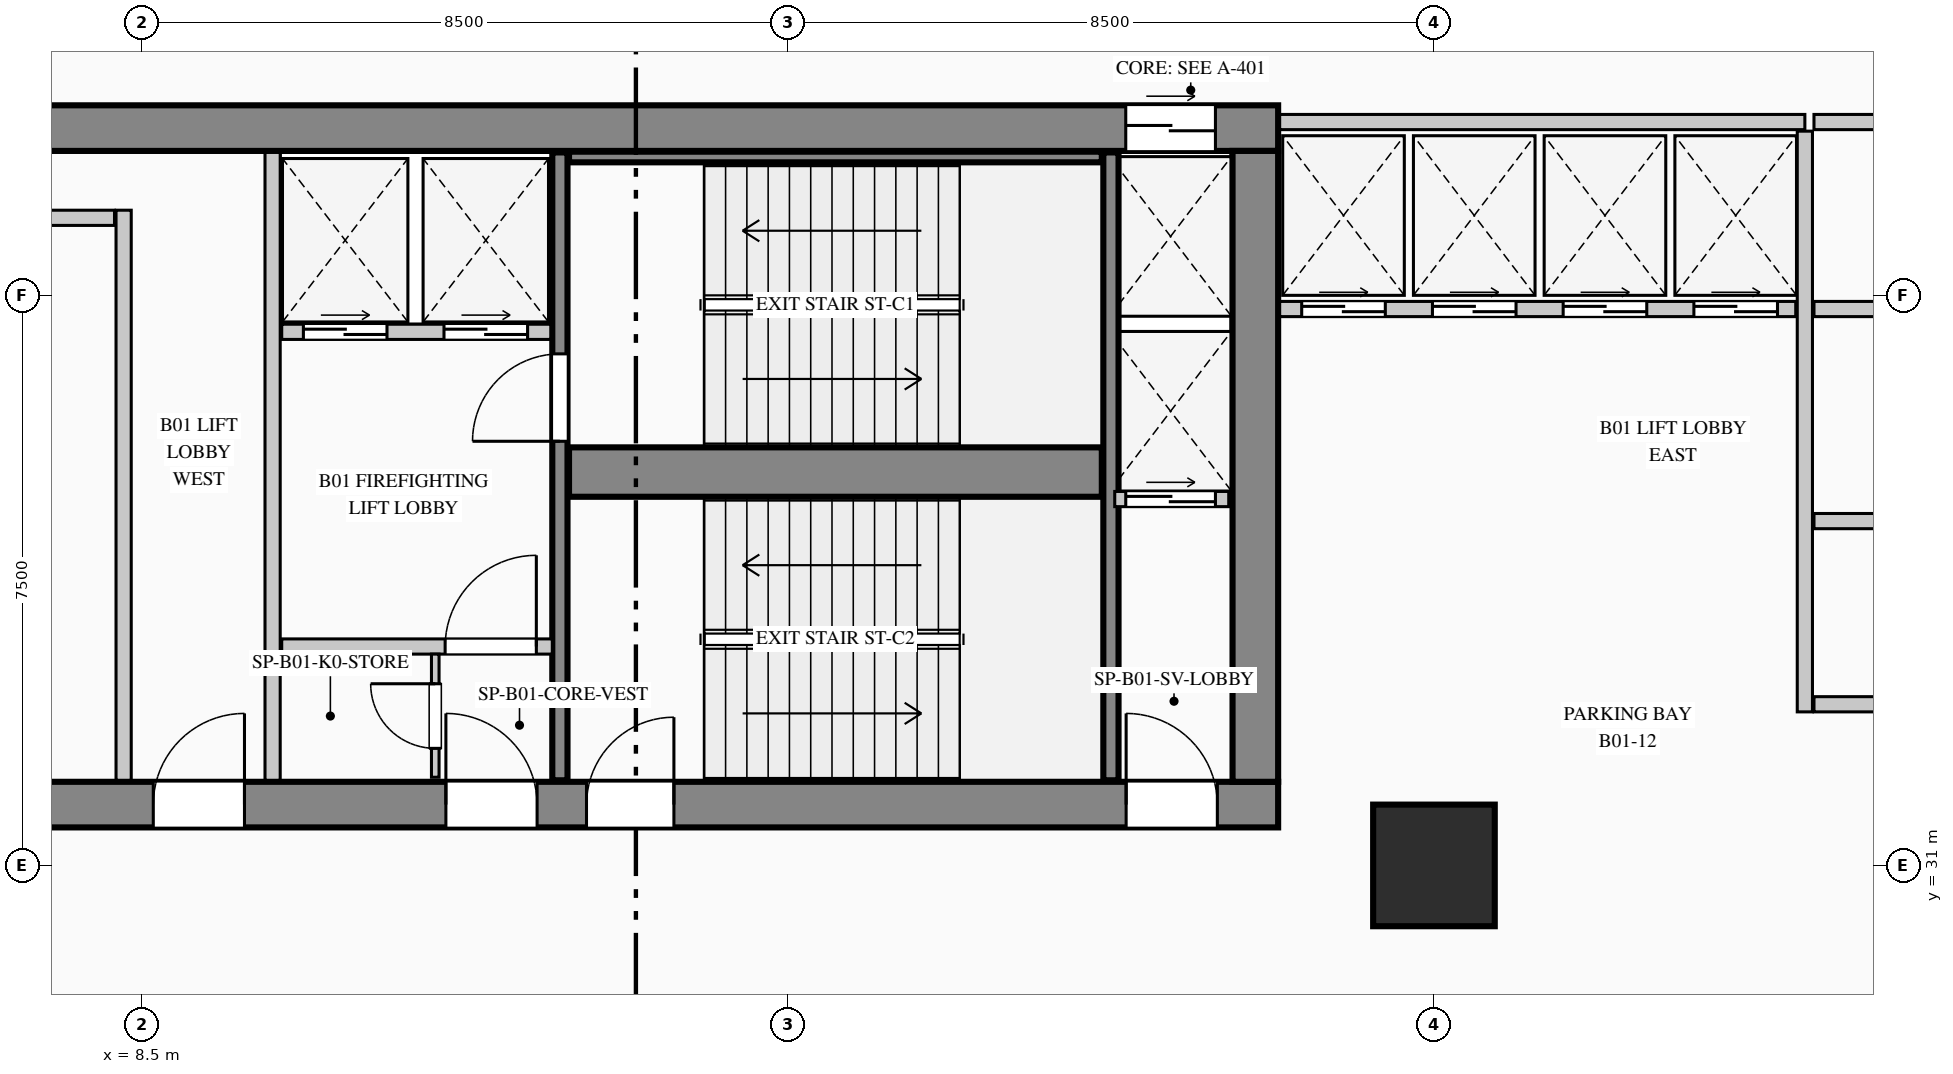
"""IFC4 building model, lengths in metres.
Left out: names, types, materials, properties, quantities, classifications, styles, units other than length and angle.
Written with IfcOpenShell. Run it as: python <this file> out.ifc"""

import sys

from ifc_helpers import new_model, si_unit, direction, frame, frame_2d, origin, origin_2d, place, context, subcontext, project, spatial, rectangle, extrude, element, fill, save


model = new_model("IFC4")
c1 = context("Model", 3, precision=1e-05, world=origin(), true_north=direction((0.0, 1.0)))
c2 = subcontext(c1, "Body", "Model", "MODEL_VIEW")
j1 = project(units=[si_unit("LENGTHUNIT", "METRE"), si_unit("PLANEANGLEUNIT", "RADIAN")], contexts=[c1])
p1 = place(None, origin())
s1 = spatial("IfcSite", under=j1, at=p1, CompositionType="ELEMENT")
p2 = place(p1, origin())
s2 = spatial("IfcBuilding", under=s1, at=p2, CompositionType="ELEMENT")
p3 = place(p2, frame((0.0, 0.0, -4.5)))
s3 = spatial("IfcBuildingStorey", under=s2, at=p3, CompositionType="ELEMENT", Elevation=-4.5)
p4 = place(p3, frame((5.4, 40.7, 0.0), z_axis=(0.0, 0.0, 1.0), x_axis=(1.0, 0.0, 0.0)))
e1 = element("IfcWall", 1, at=p4, inside=s3, PredefinedType="SHEAR", context=c2, shape_type="SweptSolid", body=[
    extrude(rectangle(XDim=18.05, YDim=0.6, at=frame_2d((9.025, 0.0))), origin(), (0.0, 0.0, 1.0), 4.5),
])
p5 = place(p4, frame((16.045, 0.0, 0.0)))
e2 = element("IfcOpeningElement", 2, at=p5, cuts=e1, PredefinedType="OPENING", context=c2, shape_type="SweptSolid", body=[
    extrude(rectangle(XDim=1.18, YDim=2.25, at=frame_2d((0.59, 1.125))), frame((0.0, 0.31, 0.0), z_axis=(0.0, -1.0, 0.0), x_axis=(1.0, 0.0, 0.0)), (0.0, 0.0, 1.0), 0.62),
])
p6 = place(p3, frame((5.4, 31.8, 0.0), z_axis=(0.0, 0.0, 1.0), x_axis=(1.0, 0.0, 0.0)))
e3 = element("IfcWall", 3, at=p6, inside=s3, PredefinedType="SHEAR", context=c2, shape_type="SweptSolid", body=[
    extrude(rectangle(XDim=18.05, YDim=0.6, at=frame_2d((9.025, 0.0))), origin(), (0.0, 0.0, 1.0), 4.5),
])
p7 = place(p6, frame((3.25, 0.0, 0.0)))
e4 = element("IfcOpeningElement", 4, at=p7, cuts=e3, PredefinedType="OPENING", context=c2, shape_type="SweptSolid", body=[
    extrude(rectangle(XDim=1.2, YDim=2.2, at=frame_2d((0.6, 1.1))), frame((0.0, 0.31, 0.0), z_axis=(0.0, -1.0, 0.0), x_axis=(1.0, 0.0, 0.0)), (0.0, 0.0, 1.0), 0.62),
])
p8 = place(p6, frame((7.1, 0.0, 0.0)))
e5 = element("IfcOpeningElement", 5, at=p8, cuts=e3, PredefinedType="OPENING", context=c2, shape_type="SweptSolid", body=[
    extrude(rectangle(XDim=1.2, YDim=2.2, at=frame_2d((0.6, 1.1))), frame((0.0, 0.31, 0.0), z_axis=(0.0, -1.0, 0.0), x_axis=(1.0, 0.0, 0.0)), (0.0, 0.0, 1.0), 0.62),
])
p9 = place(p6, frame((8.95, 0.0, 0.0)))
e6 = element("IfcOpeningElement", 6, at=p9, cuts=e3, PredefinedType="OPENING", context=c2, shape_type="SweptSolid", body=[
    extrude(rectangle(XDim=1.15, YDim=2.2, at=frame_2d((0.575, 1.1))), frame((0.0, 0.31, 0.0), z_axis=(0.0, -1.0, 0.0), x_axis=(1.0, 0.0, 0.0)), (0.0, 0.0, 1.0), 0.62),
])
p10 = place(p6, frame((16.05, 0.0, 0.0)))
e7 = element("IfcOpeningElement", 7, at=p10, cuts=e3, PredefinedType="OPENING", context=c2, shape_type="SweptSolid", body=[
    extrude(rectangle(XDim=1.2, YDim=2.2, at=frame_2d((0.6, 1.1))), frame((0.0, 0.31, 0.0), z_axis=(0.0, -1.0, 0.0), x_axis=(1.0, 0.0, 0.0)), (0.0, 0.0, 1.0), 0.62),
])
p11 = place(p3, frame((23.15, 32.1, 0.0), z_axis=(0.0, 0.0, 1.0), x_axis=(0.0, 1.0, 0.0)))
e8 = element("IfcWall", 8, at=p11, inside=s3, PredefinedType="SHEAR", context=c2, shape_type="SweptSolid", body=[
    extrude(rectangle(XDim=8.3, YDim=0.6, at=frame_2d((4.15, 0.0))), origin(), (0.0, 0.0, 1.0), 4.5),
])
p12 = place(p3, frame((14.0, 32.12, 0.0), z_axis=(0.0, 0.0, 1.0), x_axis=(0.0, 1.0, 0.0)))
e9 = element("IfcWall", 9, at=p12, inside=s3, PredefinedType="SHEAR", context=c2, shape_type="SweptSolid", body=[
    extrude(rectangle(XDim=8.26, YDim=0.2, at=frame_2d((4.13, 0.0))), origin(), (0.0, 0.0, 1.0), 4.5),
])
p13 = place(p12, frame((4.46, 0.0, 0.0)))
e10 = element("IfcOpeningElement", 10, at=p13, cuts=e9, PredefinedType="OPENING", context=c2, shape_type="SweptSolid", body=[
    extrude(rectangle(XDim=1.15, YDim=2.2, at=frame_2d((0.575, 1.1))), frame((0.0, 0.11, 0.0), z_axis=(0.0, -1.0, 0.0), x_axis=(1.0, 0.0, 0.0)), (0.0, 0.0, 1.0), 0.22),
])
p14 = place(p3, frame((14.12, 36.175, 0.0), z_axis=(0.0, 0.0, 1.0), x_axis=(1.0, 0.0, 0.0)))
e11 = element("IfcWall", 11, at=p14, inside=s3, PredefinedType="SHEAR", context=c2, shape_type="SweptSolid", body=[
    extrude(rectangle(XDim=7.01, YDim=0.65, at=frame_2d((3.505, 0.0))), origin(), (0.0, 0.0, 1.0), 4.5),
])
p15 = place(p3, frame((21.25, 32.12, 0.0), z_axis=(0.0, 0.0, 1.0), x_axis=(0.0, 1.0, 0.0)))
e12 = element("IfcWall", 12, at=p15, inside=s3, PredefinedType="SHEAR", context=c2, shape_type="SweptSolid", body=[
    extrude(rectangle(XDim=8.26, YDim=0.2, at=frame_2d((4.13, 0.0))), origin(), (0.0, 0.0, 1.0), 4.5),
])
p16 = place(p3, frame((14.12, 40.32, 0.0), z_axis=(0.0, 0.0, 1.0), x_axis=(1.0, 0.0, 0.0)))
e13 = element("IfcWall", 13, at=p16, inside=s3, PredefinedType="SHEAR", context=c2, shape_type="SweptSolid", body=[
    extrude(rectangle(XDim=7.01, YDim=0.14, at=frame_2d((3.505, 0.0))), origin(), (0.0, 0.0, 1.0), 4.5),
])
p17 = place(p3, frame((25.5, 31.0, 0.0), z_axis=(0.0, 0.0, 1.0), x_axis=(1.0, 0.0, 0.0)))
e14 = element("IfcColumn", 14, at=p17, inside=s3, PredefinedType="COLUMN", context=c2, shape_type="SweptSolid", body=[
    extrude(rectangle(XDim=1.6, YDim=1.6, at=origin_2d()), origin(), (0.0, 0.0, 1.0), 4.5),
])
p18 = place(p3, frame((8.26, 32.12, 0.0), z_axis=(0.0, 0.0, 1.0), x_axis=(0.0, 1.0, 0.0)))
e15 = element("IfcWall", 15, at=p18, inside=s3, PredefinedType="PARTITIONING", context=c2, shape_type="SweptSolid", body=[
    extrude(rectangle(XDim=7.5, YDim=0.2, at=frame_2d((3.75, 0.0))), origin(), (0.0, 0.0, 1.0), 4.165),
])
p19 = place(p3, frame((6.02, 39.52, 0.0), z_axis=(0.0, 0.0, 1.0), x_axis=(1.0, 0.0, 0.0)))
e16 = element("IfcWall", 16, at=p19, inside=s3, PredefinedType="PARTITIONING", context=c2, shape_type="SweptSolid", body=[
    extrude(rectangle(XDim=2.12, YDim=0.2, at=frame_2d((1.06, 0.0))), origin(), (0.0, 0.0, 1.0), 4.165),
])
p20 = place(p3, frame((10.22, 32.12, 0.0), z_axis=(0.0, 0.0, 1.0), x_axis=(0.0, 1.0, 0.0)))
e17 = element("IfcWall", 17, at=p20, inside=s3, PredefinedType="PARTITIONING", context=c2, shape_type="SweptSolid", body=[
    extrude(rectangle(XDim=8.26, YDim=0.2, at=frame_2d((4.13, 0.0))), origin(), (0.0, 0.0, 1.0), 4.165),
])
p21 = place(p3, frame((10.34, 38.02, 0.0), z_axis=(0.0, 0.0, 1.0), x_axis=(1.0, 0.0, 0.0)))
e18 = element("IfcWall", 18, at=p21, inside=s3, PredefinedType="PARTITIONING", context=c2, shape_type="SweptSolid", body=[
    extrude(rectangle(XDim=3.54, YDim=0.2, at=frame_2d((1.77, 0.0))), origin(), (0.0, 0.0, 1.0), 4.165),
])
p22 = place(p21, frame((0.285, 0.0, 0.0)))
e19 = element("IfcOpeningElement", 19, at=p22, cuts=e18, PredefinedType="OPENING", context=c2, shape_type="SweptSolid", body=[
    extrude(rectangle(XDim=1.1, YDim=2.2, at=frame_2d((0.55, 1.1))), frame((0.0, 0.11, 0.0), z_axis=(0.0, -1.0, 0.0), x_axis=(1.0, 0.0, 0.0)), (0.0, 0.0, 1.0), 0.22),
])
p23 = place(p21, frame((2.135, 0.0, 0.0)))
e20 = element("IfcOpeningElement", 20, at=p23, cuts=e18, PredefinedType="OPENING", context=c2, shape_type="SweptSolid", body=[
    extrude(rectangle(XDim=1.1, YDim=2.2, at=frame_2d((0.55, 1.1))), frame((0.0, 0.11, 0.0), z_axis=(0.0, -1.0, 0.0), x_axis=(1.0, 0.0, 0.0)), (0.0, 0.0, 1.0), 0.22),
])
p24 = place(p3, frame((10.34, 33.88, 0.0), z_axis=(0.0, 0.0, 1.0), x_axis=(1.0, 0.0, 0.0)))
e21 = element("IfcWall", 21, at=p24, inside=s3, PredefinedType="PARTITIONING", context=c2, shape_type="SweptSolid", body=[
    extrude(rectangle(XDim=3.56, YDim=0.2, at=frame_2d((1.78, 0.0))), origin(), (0.0, 0.0, 1.0), 4.165),
])
p25 = place(p24, frame((2.15, 0.0, 0.0)))
e22 = element("IfcOpeningElement", 22, at=p25, cuts=e21, PredefinedType="OPENING", context=c2, shape_type="SweptSolid", body=[
    extrude(rectangle(XDim=1.2, YDim=2.2, at=frame_2d((0.6, 1.1))), frame((0.0, 0.11, 0.0), z_axis=(0.0, -1.0, 0.0), x_axis=(1.0, 0.0, 0.0)), (0.0, 0.0, 1.0), 0.22),
])
p26 = place(p3, frame((12.36, 32.16, 0.0), z_axis=(0.0, 0.0, 1.0), x_axis=(0.0, 1.0, 0.0)))
e23 = element("IfcWall", 23, at=p26, inside=s3, PredefinedType="PARTITIONING", context=c2, shape_type="SweptSolid", body=[
    extrude(rectangle(XDim=1.62, YDim=0.1, at=frame_2d((0.81, 0.0))), origin(), (0.0, 0.0, 1.0), 4.165),
])
p27 = place(p26, frame((0.38, 0.0, 0.0)))
e24 = element("IfcOpeningElement", 24, at=p27, cuts=e23, PredefinedType="OPENING", context=c2, shape_type="SweptSolid", body=[
    extrude(rectangle(XDim=0.85, YDim=2.1, at=frame_2d((0.425, 1.05))), frame((0.0, 0.06, 0.0), z_axis=(0.0, -1.0, 0.0), x_axis=(1.0, 0.0, 0.0)), (0.0, 0.0, 1.0), 0.12),
])
p28 = place(p3, frame((21.3, 35.82, 0.0), z_axis=(0.0, 0.0, 1.0), x_axis=(1.0, 0.0, 0.0)))
e25 = element("IfcWall", 25, at=p28, inside=s3, PredefinedType="PARTITIONING", context=c2, shape_type="SweptSolid", body=[
    extrude(rectangle(XDim=1.5, YDim=0.2, at=frame_2d((0.75, 0.0))), origin(), (0.0, 0.0, 1.0), 4.165),
])
p29 = place(p28, frame((0.145, 0.0, 0.0)))
e26 = element("IfcOpeningElement", 26, at=p29, cuts=e25, PredefinedType="OPENING", context=c2, shape_type="SweptSolid", body=[
    extrude(rectangle(XDim=1.18, YDim=2.25, at=frame_2d((0.59, 1.125))), frame((0.0, 0.11, 0.0), z_axis=(0.0, -1.0, 0.0), x_axis=(1.0, 0.0, 0.0)), (0.0, 0.0, 1.0), 0.22),
])
p30 = place(p3, frame((23.47, 40.78, 0.0), z_axis=(0.0, 0.0, 1.0), x_axis=(1.0, 0.0, 0.0)))
e27 = element("IfcWall", 27, at=p30, inside=s3, PredefinedType="PARTITIONING", context=c2, shape_type="SweptSolid", body=[
    extrude(rectangle(XDim=6.91, YDim=0.2, at=frame_2d((3.455, 0.0))), origin(), (0.0, 0.0, 1.0), 4.165),
])
p31 = place(p3, frame((30.38, 33.02, 0.0), z_axis=(0.0, 0.0, 1.0), x_axis=(0.0, 1.0, 0.0)))
e28 = element("IfcWall", 28, at=p31, inside=s3, PredefinedType="PARTITIONING", context=c2, shape_type="SweptSolid", body=[
    extrude(rectangle(XDim=7.64, YDim=0.2, at=frame_2d((3.82, 0.0))), origin(), (0.0, 0.0, 1.0), 4.165),
])
p32 = place(p3, frame((23.47, 38.32, 0.0), z_axis=(0.0, 0.0, 1.0), x_axis=(1.0, 0.0, 0.0)))
e29 = element("IfcWall", 29, at=p32, inside=s3, PredefinedType="PARTITIONING", context=c2, shape_type="SweptSolid", body=[
    extrude(rectangle(XDim=6.79, YDim=0.2, at=frame_2d((3.395, 0.0))), origin(), (0.0, 0.0, 1.0), 4.165),
])
p33 = place(p32, frame((0.29, 0.0, 0.0)))
e30 = element("IfcOpeningElement", 30, at=p33, cuts=e29, PredefinedType="OPENING", context=c2, shape_type="SweptSolid", body=[
    extrude(rectangle(XDim=1.1, YDim=2.2, at=frame_2d((0.55, 1.1))), frame((0.0, 0.11, 0.0), z_axis=(0.0, -1.0, 0.0), x_axis=(1.0, 0.0, 0.0)), (0.0, 0.0, 1.0), 0.22),
])
p34 = place(p32, frame((2.01, 0.0, 0.0)))
e31 = element("IfcOpeningElement", 31, at=p34, cuts=e29, PredefinedType="OPENING", context=c2, shape_type="SweptSolid", body=[
    extrude(rectangle(XDim=1.1, YDim=2.2, at=frame_2d((0.55, 1.1))), frame((0.0, 0.11, 0.0), z_axis=(0.0, -1.0, 0.0), x_axis=(1.0, 0.0, 0.0)), (0.0, 0.0, 1.0), 0.22),
])
p35 = place(p32, frame((3.73, 0.0, 0.0)))
e32 = element("IfcOpeningElement", 32, at=p35, cuts=e29, PredefinedType="OPENING", context=c2, shape_type="SweptSolid", body=[
    extrude(rectangle(XDim=1.1, YDim=2.2, at=frame_2d((0.55, 1.1))), frame((0.0, 0.11, 0.0), z_axis=(0.0, -1.0, 0.0), x_axis=(1.0, 0.0, 0.0)), (0.0, 0.0, 1.0), 0.22),
])
p36 = place(p32, frame((5.45, 0.0, 0.0)))
e33 = element("IfcOpeningElement", 33, at=p36, cuts=e29, PredefinedType="OPENING", context=c2, shape_type="SweptSolid", body=[
    extrude(rectangle(XDim=1.1, YDim=2.2, at=frame_2d((0.55, 1.1))), frame((0.0, 0.11, 0.0), z_axis=(0.0, -1.0, 0.0), x_axis=(1.0, 0.0, 0.0)), (0.0, 0.0, 1.0), 0.22),
])
p37 = place(p3, frame((30.5, 40.78, 0.0), z_axis=(0.0, 0.0, 1.0), x_axis=(1.0, 0.0, 0.0)))
e34 = element("IfcWall", 34, at=p37, inside=s3, PredefinedType="PARTITIONING", context=c2, shape_type="SweptSolid", body=[
    extrude(rectangle(XDim=6.98, YDim=0.2, at=frame_2d((3.49, 0.0))), origin(), (0.0, 0.0, 1.0), 4.165),
])
p38 = place(p3, frame((30.5, 38.32, 0.0), z_axis=(0.0, 0.0, 1.0), x_axis=(1.0, 0.0, 0.0)))
e35 = element("IfcWall", 35, at=p38, inside=s3, PredefinedType="PARTITIONING", context=c2, shape_type="SweptSolid", body=[
    extrude(rectangle(XDim=3.248, YDim=0.2, at=frame_2d((1.624, 0.0))), origin(), (0.0, 0.0, 1.0), 4.165),
])
for number, where, z_axis, x_axis in (
    (36, (30.5, 35.53, 0.0), (0.0, 0.0, 1.0), (1.0, 0.0, 0.0)),
    (37, (30.5, 33.12, 0.0), (0.0, 0.0, 1.0), (1.0, 0.0, 0.0)),
):
    element("IfcWall", number, at=place(p3, frame(where, z_axis=z_axis, x_axis=x_axis)), inside=s3, PredefinedType="PARTITIONING", context=c2, shape_type="SweptSolid", body=[
        extrude(rectangle(XDim=3.8, YDim=0.2, at=frame_2d((1.9, 0.0))), origin(), (0.0, 0.0, 1.0), 4.165),
    ])
p39 = place(p7, origin())
e38 = element("IfcDoor", 38, at=p39, inside=s3, OperationType="SINGLE_SWING_RIGHT", PredefinedType="DOOR", context=c2, shape_type="SweptSolid", body=[
    extrude(rectangle(XDim=1.2, YDim=2.2, at=frame_2d((0.6, 1.1))), frame((0.0, 0.025, 0.0), z_axis=(0.0, -1.0, 0.0), x_axis=(1.0, 0.0, 0.0)), (0.0, 0.0, 1.0), 0.05),
])
fill(e4, e38)
p40 = place(p8, origin())
e39 = element("IfcDoor", 39, at=p40, inside=s3, OperationType="SINGLE_SWING_LEFT", PredefinedType="DOOR", context=c2, shape_type="SweptSolid", body=[
    extrude(rectangle(XDim=1.2, YDim=2.2, at=frame_2d((0.6, 1.1))), frame((0.0, 0.025, 0.0), z_axis=(0.0, -1.0, 0.0), x_axis=(1.0, 0.0, 0.0)), (0.0, 0.0, 1.0), 0.05),
])
fill(e5, e39)
p41 = place(p9, origin())
e40 = element("IfcDoor", 40, at=p41, inside=s3, OperationType="SINGLE_SWING_RIGHT", PredefinedType="DOOR", context=c2, shape_type="SweptSolid", body=[
    extrude(rectangle(XDim=1.15, YDim=2.2, at=frame_2d((0.575, 1.1))), frame((0.0, 0.025, 0.0), z_axis=(0.0, -1.0, 0.0), x_axis=(1.0, 0.0, 0.0)), (0.0, 0.0, 1.0), 0.05),
])
fill(e6, e40)
p42 = place(p10, origin())
e41 = element("IfcDoor", 41, at=p42, inside=s3, OperationType="SINGLE_SWING_LEFT", PredefinedType="DOOR", context=c2, shape_type="SweptSolid", body=[
    extrude(rectangle(XDim=1.2, YDim=2.2, at=frame_2d((0.6, 1.1))), frame((0.0, 0.025, 0.0), z_axis=(0.0, -1.0, 0.0), x_axis=(1.0, 0.0, 0.0)), (0.0, 0.0, 1.0), 0.05),
])
fill(e7, e41)
p43 = place(p25, origin())
e42 = element("IfcDoor", 42, at=p43, inside=s3, OperationType="SINGLE_SWING_RIGHT", PredefinedType="DOOR", context=c2, shape_type="SweptSolid", body=[
    extrude(rectangle(XDim=1.2, YDim=2.2, at=frame_2d((0.6, 1.1))), frame((0.0, 0.025, 0.0), z_axis=(0.0, -1.0, 0.0), x_axis=(1.0, 0.0, 0.0)), (0.0, 0.0, 1.0), 0.05),
])
fill(e22, e42)
p44 = place(p27, origin())
e43 = element("IfcDoor", 43, at=p44, inside=s3, OperationType="SINGLE_SWING_RIGHT", PredefinedType="DOOR", context=c2, shape_type="SweptSolid", body=[
    extrude(rectangle(XDim=0.85, YDim=2.1, at=frame_2d((0.425, 1.05))), frame((0.0, 0.025, 0.0), z_axis=(0.0, -1.0, 0.0), x_axis=(1.0, 0.0, 0.0)), (0.0, 0.0, 1.0), 0.05),
])
fill(e24, e43)
p45 = place(p13, origin())
e44 = element("IfcDoor", 44, at=p45, inside=s3, OperationType="SINGLE_SWING_LEFT", PredefinedType="DOOR", context=c2, shape_type="SweptSolid", body=[
    extrude(rectangle(XDim=1.15, YDim=2.2, at=frame_2d((0.575, 1.1))), frame((0.0, 0.025, 0.0), z_axis=(0.0, -1.0, 0.0), x_axis=(1.0, 0.0, 0.0)), (0.0, 0.0, 1.0), 0.05),
])
fill(e10, e44)
p46 = place(p22, origin())
e45 = element("IfcDoor", 45, at=p46, inside=s3, OperationType="DOUBLE_DOOR_SLIDING", PredefinedType="DOOR", context=c2, shape_type="SweptSolid", body=[
    extrude(rectangle(XDim=1.1, YDim=2.2, at=frame_2d((0.55, 1.1))), frame((0.0, 0.025, 0.0), z_axis=(0.0, -1.0, 0.0), x_axis=(1.0, 0.0, 0.0)), (0.0, 0.0, 1.0), 0.05),
])
fill(e19, e45)
p47 = place(p23, origin())
e46 = element("IfcDoor", 46, at=p47, inside=s3, OperationType="DOUBLE_DOOR_SLIDING", PredefinedType="DOOR", context=c2, shape_type="SweptSolid", body=[
    extrude(rectangle(XDim=1.1, YDim=2.2, at=frame_2d((0.55, 1.1))), frame((0.0, 0.025, 0.0), z_axis=(0.0, -1.0, 0.0), x_axis=(1.0, 0.0, 0.0)), (0.0, 0.0, 1.0), 0.05),
])
fill(e20, e46)
p48 = place(p5, origin())
e47 = element("IfcDoor", 47, at=p48, inside=s3, OperationType="DOUBLE_DOOR_SLIDING", PredefinedType="DOOR", context=c2, shape_type="SweptSolid", body=[
    extrude(rectangle(XDim=1.18, YDim=2.25, at=frame_2d((0.59, 1.125))), frame((0.0, 0.025, 0.0), z_axis=(0.0, -1.0, 0.0), x_axis=(1.0, 0.0, 0.0)), (0.0, 0.0, 1.0), 0.05),
])
fill(e2, e47)
p49 = place(p29, origin())
e48 = element("IfcDoor", 48, at=p49, inside=s3, OperationType="DOUBLE_DOOR_SLIDING", PredefinedType="DOOR", context=c2, shape_type="SweptSolid", body=[
    extrude(rectangle(XDim=1.18, YDim=2.25, at=frame_2d((0.59, 1.125))), frame((0.0, 0.025, 0.0), z_axis=(0.0, -1.0, 0.0), x_axis=(1.0, 0.0, 0.0)), (0.0, 0.0, 1.0), 0.05),
])
fill(e26, e48)
p50 = place(p33, origin())
e49 = element("IfcDoor", 49, at=p50, inside=s3, OperationType="DOUBLE_DOOR_SLIDING", PredefinedType="DOOR", context=c2, shape_type="SweptSolid", body=[
    extrude(rectangle(XDim=1.1, YDim=2.2, at=frame_2d((0.55, 1.1))), frame((0.0, 0.025, 0.0), z_axis=(0.0, -1.0, 0.0), x_axis=(1.0, 0.0, 0.0)), (0.0, 0.0, 1.0), 0.05),
])
fill(e30, e49)
p51 = place(p34, origin())
e50 = element("IfcDoor", 50, at=p51, inside=s3, OperationType="DOUBLE_DOOR_SLIDING", PredefinedType="DOOR", context=c2, shape_type="SweptSolid", body=[
    extrude(rectangle(XDim=1.1, YDim=2.2, at=frame_2d((0.55, 1.1))), frame((0.0, 0.025, 0.0), z_axis=(0.0, -1.0, 0.0), x_axis=(1.0, 0.0, 0.0)), (0.0, 0.0, 1.0), 0.05),
])
fill(e31, e50)
p52 = place(p35, origin())
e51 = element("IfcDoor", 51, at=p52, inside=s3, OperationType="DOUBLE_DOOR_SLIDING", PredefinedType="DOOR", context=c2, shape_type="SweptSolid", body=[
    extrude(rectangle(XDim=1.1, YDim=2.2, at=frame_2d((0.55, 1.1))), frame((0.0, 0.025, 0.0), z_axis=(0.0, -1.0, 0.0), x_axis=(1.0, 0.0, 0.0)), (0.0, 0.0, 1.0), 0.05),
])
fill(e32, e51)
p53 = place(p36, origin())
e52 = element("IfcDoor", 52, at=p53, inside=s3, OperationType="DOUBLE_DOOR_SLIDING", PredefinedType="DOOR", context=c2, shape_type="SweptSolid", body=[
    extrude(rectangle(XDim=1.1, YDim=2.2, at=frame_2d((0.55, 1.1))), frame((0.0, 0.025, 0.0), z_axis=(0.0, -1.0, 0.0), x_axis=(1.0, 0.0, 0.0)), (0.0, 0.0, 1.0), 0.05),
])
fill(e33, e52)
save(model, sys.argv[1])
